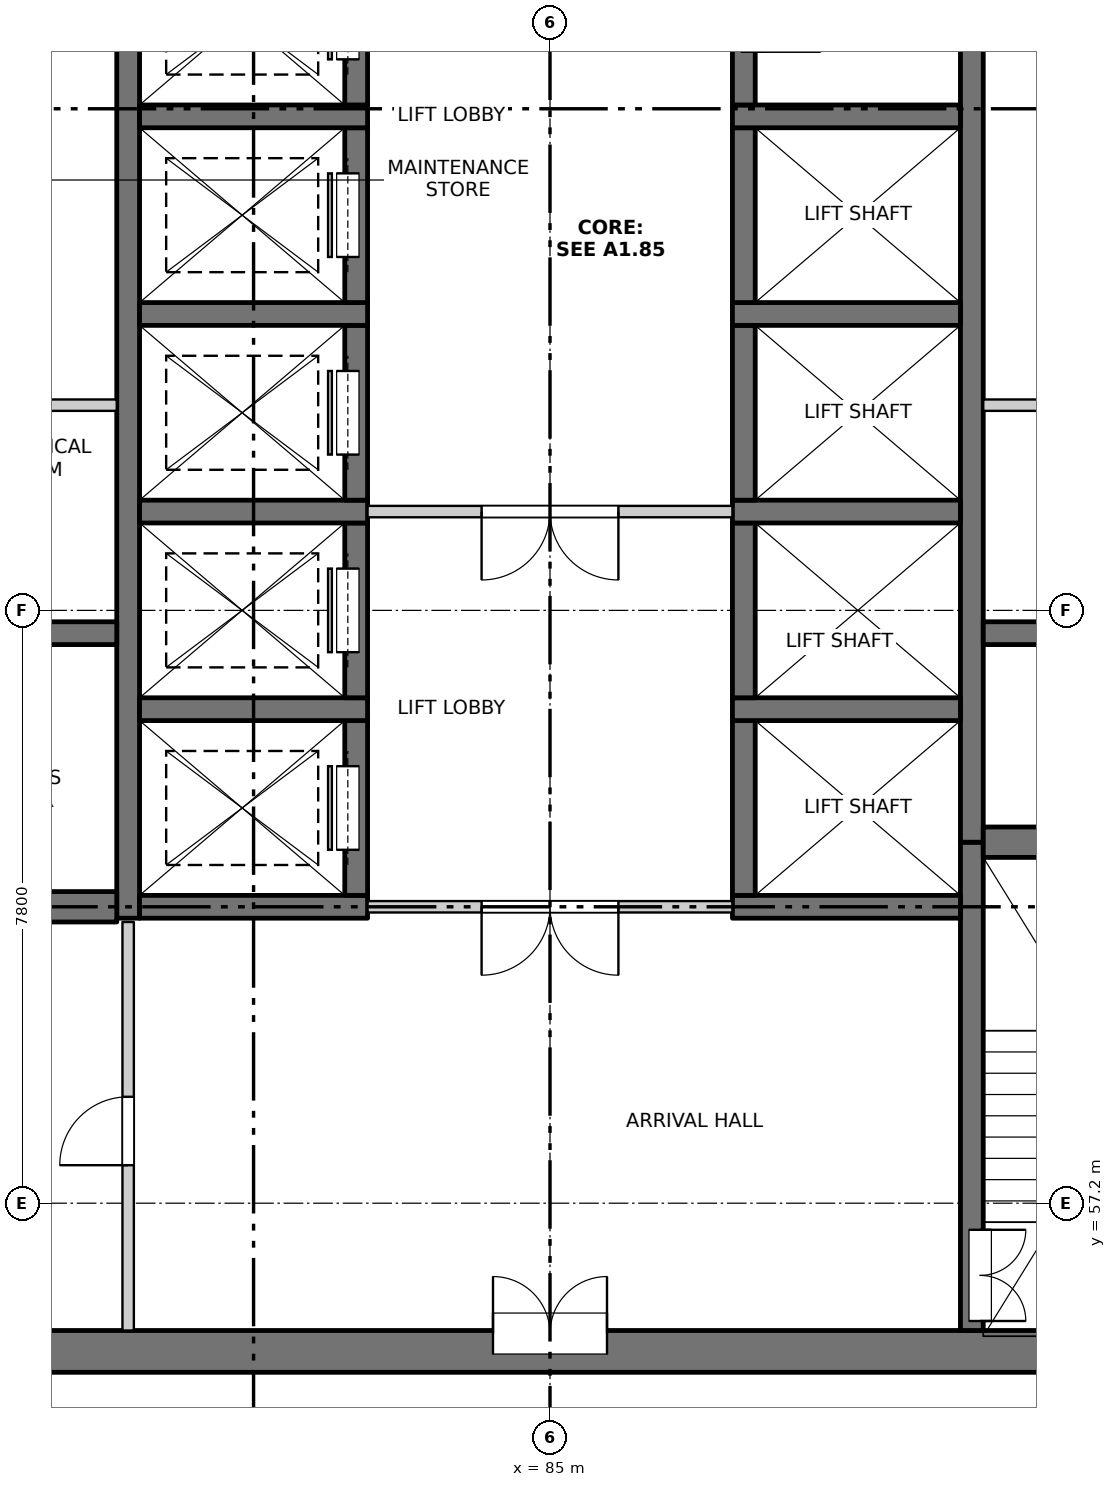
"""IFC4 building model, lengths in metres.
Left out: names, types, materials, properties, quantities, classifications, styles, units other than length and angle.
Written with IfcOpenShell. Run it as: python <this file> out.ifc"""

import sys

from ifc_helpers import new_model, si_unit, direction, frame, frame_2d, origin, place, context, subcontext, project, spatial, rectangle, extrude, element, fill, save


model = new_model("IFC4")
c1 = context("Model", 3, precision=1e-05, world=origin(), true_north=direction((0.0, 1.0)))
c2 = subcontext(c1, "Body", "Model", "MODEL_VIEW")
j1 = project(units=[si_unit("LENGTHUNIT", "METRE"), si_unit("PLANEANGLEUNIT", "RADIAN")], contexts=[c1])
p1 = place(None, origin())
s1 = spatial("IfcSite", under=j1, at=p1, CompositionType="ELEMENT")
p2 = place(p1, origin())
s2 = spatial("IfcBuilding", under=s1, at=p2, CompositionType="ELEMENT")
p3 = place(p2, frame((0.0, 0.0, 110.1)))
s3 = spatial("IfcBuildingStorey", under=s2, at=p3, CompositionType="ELEMENT", Elevation=110.1)
p4 = place(p3, frame((75.525, 55.25, -0.25), z_axis=(0.0, 0.0, 1.0), x_axis=(1.0, 0.0, 0.0)))
e1 = element("IfcWall", 1, at=p4, inside=s3, PredefinedType="SOLIDWALL", context=c2, shape_type="SweptSolid", body=[
    extrude(rectangle(XDim=18.95, YDim=0.55, at=frame_2d((9.475, 0.0))), origin(), (0.0, 0.0, 1.0), 3.4),
])
p5 = place(p4, frame((8.725, 0.0, 0.25)))
e2 = element("IfcOpeningElement", 2, at=p5, cuts=e1, PredefinedType="OPENING", context=c2, shape_type="SweptSolid", body=[
    extrude(rectangle(XDim=1.5, YDim=2.1, at=frame_2d((0.75, 1.05))), frame((0.0, 0.285, 0.0), z_axis=(0.0, -1.0, 0.0), x_axis=(1.0, 0.0, 0.0)), (0.0, 0.0, 1.0), 0.57),
])
p6 = place(p3, frame((79.45, 60.95, -0.25), z_axis=(0.0, 0.0, 1.0), x_axis=(0.0, 1.0, 0.0)))
e3 = element("IfcWall", 3, at=p6, inside=s3, PredefinedType="SOLIDWALL", context=c2, shape_type="SweptSolid", body=[
    extrude(rectangle(XDim=16.35, YDim=0.3, at=frame_2d((8.175, 0.0))), origin(), (0.0, 0.0, 1.0), 3.4),
])
p7 = place(p3, frame((90.55, 55.525, -0.25), z_axis=(0.0, 0.0, 1.0), x_axis=(0.0, 1.0, 0.0)))
e4 = element("IfcWall", 4, at=p7, inside=s3, PredefinedType="SOLIDWALL", context=c2, shape_type="SweptSolid", body=[
    extrude(rectangle(XDim=6.425, YDim=0.3, at=frame_2d((3.212, 0.0))), origin(), (0.0, 0.0, 1.0), 3.4),
])
p8 = place(p7, frame((0.125, 0.0, 0.25)))
e5 = element("IfcOpeningElement", 5, at=p8, cuts=e4, PredefinedType="OPENING", context=c2, shape_type="SweptSolid", body=[
    extrude(rectangle(XDim=1.2, YDim=2.1, at=frame_2d((0.6, 1.05))), frame((0.0, 0.16, 0.0), z_axis=(0.0, -1.0, 0.0), x_axis=(1.0, 0.0, 0.0)), (0.0, 0.0, 1.0), 0.32),
])
p9 = place(p3, frame((90.55, 61.95, -0.25), z_axis=(0.0, 0.0, 1.0), x_axis=(0.0, 1.0, 0.0)))
e6 = element("IfcWall", 6, at=p9, inside=s3, PredefinedType="SOLIDWALL", context=c2, shape_type="SweptSolid", body=[
    extrude(rectangle(XDim=15.35, YDim=0.3, at=frame_2d((7.675, 0.0))), origin(), (0.0, 0.0, 1.0), 3.4),
])
p10 = place(p3, frame((79.6, 61.1, -0.25), z_axis=(0.0, 0.0, 1.0), x_axis=(1.0, 0.0, 0.0)))
e7 = element("IfcWall", 7, at=p10, inside=s3, PredefinedType="SOLIDWALL", context=c2, shape_type="SweptSolid", body=[
    extrude(rectangle(XDim=3.0, YDim=0.3, at=frame_2d((1.5, 0.0))), origin(), (0.0, 0.0, 1.0), 3.4),
])
p11 = place(p3, frame((82.45, 61.25, -0.25), z_axis=(0.0, 0.0, 1.0), x_axis=(0.0, 1.0, 0.0)))
e8 = element("IfcWall", 8, at=p11, inside=s3, PredefinedType="SOLIDWALL", context=c2, shape_type="SweptSolid", body=[
    extrude(rectangle(XDim=2.3, YDim=0.3, at=frame_2d((1.15, 0.0))), origin(), (0.0, 0.0, 1.0), 3.4),
])
p12 = place(p11, frame((0.6, 0.0, 0.25)))
e9 = element("IfcOpeningElement", 9, at=p12, cuts=e8, PredefinedType="OPENING", context=c2, shape_type="SweptSolid", body=[
    extrude(rectangle(XDim=1.1, YDim=2.1, at=frame_2d((0.55, 1.05))), frame((0.0, 0.16, 0.0), z_axis=(0.0, -1.0, 0.0), x_axis=(1.0, 0.0, 0.0)), (0.0, 0.0, 1.0), 0.32),
])
p13 = place(p3, frame((79.6, 63.7, -0.25), z_axis=(0.0, 0.0, 1.0), x_axis=(1.0, 0.0, 0.0)))
e10 = element("IfcWall", 10, at=p13, inside=s3, PredefinedType="SOLIDWALL", context=c2, shape_type="SweptSolid", body=[
    extrude(rectangle(XDim=3.0, YDim=0.3, at=frame_2d((1.5, 0.0))), origin(), (0.0, 0.0, 1.0), 3.4),
])
p14 = place(p3, frame((82.45, 63.85, -0.25), z_axis=(0.0, 0.0, 1.0), x_axis=(0.0, 1.0, 0.0)))
e11 = element("IfcWall", 11, at=p14, inside=s3, PredefinedType="SOLIDWALL", context=c2, shape_type="SweptSolid", body=[
    extrude(rectangle(XDim=2.3, YDim=0.3, at=frame_2d((1.15, 0.0))), origin(), (0.0, 0.0, 1.0), 3.4),
])
p15 = place(p14, frame((0.6, 0.0, 0.25)))
e12 = element("IfcOpeningElement", 12, at=p15, cuts=e11, PredefinedType="OPENING", context=c2, shape_type="SweptSolid", body=[
    extrude(rectangle(XDim=1.1, YDim=2.1, at=frame_2d((0.55, 1.05))), frame((0.0, 0.16, 0.0), z_axis=(0.0, -1.0, 0.0), x_axis=(1.0, 0.0, 0.0)), (0.0, 0.0, 1.0), 0.32),
])
p16 = place(p3, frame((79.6, 66.3, -0.25), z_axis=(0.0, 0.0, 1.0), x_axis=(1.0, 0.0, 0.0)))
e13 = element("IfcWall", 13, at=p16, inside=s3, PredefinedType="SOLIDWALL", context=c2, shape_type="SweptSolid", body=[
    extrude(rectangle(XDim=3.0, YDim=0.3, at=frame_2d((1.5, 0.0))), origin(), (0.0, 0.0, 1.0), 3.4),
])
p17 = place(p3, frame((82.45, 66.45, -0.25), z_axis=(0.0, 0.0, 1.0), x_axis=(0.0, 1.0, 0.0)))
e14 = element("IfcWall", 14, at=p17, inside=s3, PredefinedType="SOLIDWALL", context=c2, shape_type="SweptSolid", body=[
    extrude(rectangle(XDim=2.3, YDim=0.3, at=frame_2d((1.15, 0.0))), origin(), (0.0, 0.0, 1.0), 3.4),
])
p18 = place(p17, frame((0.6, 0.0, 0.25)))
e15 = element("IfcOpeningElement", 15, at=p18, cuts=e14, PredefinedType="OPENING", context=c2, shape_type="SweptSolid", body=[
    extrude(rectangle(XDim=1.1, YDim=2.1, at=frame_2d((0.55, 1.05))), frame((0.0, 0.16, 0.0), z_axis=(0.0, -1.0, 0.0), x_axis=(1.0, 0.0, 0.0)), (0.0, 0.0, 1.0), 0.32),
])
p19 = place(p3, frame((79.6, 68.9, -0.25), z_axis=(0.0, 0.0, 1.0), x_axis=(1.0, 0.0, 0.0)))
e16 = element("IfcWall", 16, at=p19, inside=s3, PredefinedType="SOLIDWALL", context=c2, shape_type="SweptSolid", body=[
    extrude(rectangle(XDim=3.0, YDim=0.3, at=frame_2d((1.5, 0.0))), origin(), (0.0, 0.0, 1.0), 3.4),
])
p20 = place(p3, frame((82.45, 69.05, -0.25), z_axis=(0.0, 0.0, 1.0), x_axis=(0.0, 1.0, 0.0)))
e17 = element("IfcWall", 17, at=p20, inside=s3, PredefinedType="SOLIDWALL", context=c2, shape_type="SweptSolid", body=[
    extrude(rectangle(XDim=2.3, YDim=0.3, at=frame_2d((1.15, 0.0))), origin(), (0.0, 0.0, 1.0), 3.4),
])
p21 = place(p20, frame((0.6, 0.0, 0.25)))
e18 = element("IfcOpeningElement", 18, at=p21, cuts=e17, PredefinedType="OPENING", context=c2, shape_type="SweptSolid", body=[
    extrude(rectangle(XDim=1.1, YDim=2.1, at=frame_2d((0.55, 1.05))), frame((0.0, 0.16, 0.0), z_axis=(0.0, -1.0, 0.0), x_axis=(1.0, 0.0, 0.0)), (0.0, 0.0, 1.0), 0.32),
])
p22 = place(p3, frame((79.6, 71.5, -0.25), z_axis=(0.0, 0.0, 1.0), x_axis=(1.0, 0.0, 0.0)))
e19 = element("IfcWall", 19, at=p22, inside=s3, PredefinedType="SOLIDWALL", context=c2, shape_type="SweptSolid", body=[
    extrude(rectangle(XDim=3.0, YDim=0.3, at=frame_2d((1.5, 0.0))), origin(), (0.0, 0.0, 1.0), 3.4),
])
p23 = place(p3, frame((82.45, 71.65, -0.25), z_axis=(0.0, 0.0, 1.0), x_axis=(0.0, 1.0, 0.0)))
e20 = element("IfcWall", 20, at=p23, inside=s3, PredefinedType="SOLIDWALL", context=c2, shape_type="SweptSolid", body=[
    extrude(rectangle(XDim=2.3, YDim=0.3, at=frame_2d((1.15, 0.0))), origin(), (0.0, 0.0, 1.0), 3.4),
])
p24 = place(p23, frame((0.6, 0.0, 0.25)))
e21 = element("IfcOpeningElement", 21, at=p24, cuts=e20, PredefinedType="OPENING", context=c2, shape_type="SweptSolid", body=[
    extrude(rectangle(XDim=1.1, YDim=2.1, at=frame_2d((0.55, 1.05))), frame((0.0, 0.16, 0.0), z_axis=(0.0, -1.0, 0.0), x_axis=(1.0, 0.0, 0.0)), (0.0, 0.0, 1.0), 0.32),
])
p25 = place(p3, frame((87.4, 61.1, -0.25), z_axis=(0.0, 0.0, 1.0), x_axis=(1.0, 0.0, 0.0)))
e22 = element("IfcWall", 22, at=p25, inside=s3, PredefinedType="SOLIDWALL", context=c2, shape_type="SweptSolid", body=[
    extrude(rectangle(XDim=3.0, YDim=0.3, at=frame_2d((1.5, 0.0))), origin(), (0.0, 0.0, 1.0), 3.4),
])
p26 = place(p3, frame((87.55, 61.25, -0.25), z_axis=(0.0, 0.0, 1.0), x_axis=(0.0, 1.0, 0.0)))
e23 = element("IfcWall", 23, at=p26, inside=s3, PredefinedType="SOLIDWALL", context=c2, shape_type="SweptSolid", body=[
    extrude(rectangle(XDim=2.3, YDim=0.3, at=frame_2d((1.15, 0.0))), origin(), (0.0, 0.0, 1.0), 3.4),
])
p27 = place(p3, frame((87.4, 63.7, -0.25), z_axis=(0.0, 0.0, 1.0), x_axis=(1.0, 0.0, 0.0)))
e24 = element("IfcWall", 24, at=p27, inside=s3, PredefinedType="SOLIDWALL", context=c2, shape_type="SweptSolid", body=[
    extrude(rectangle(XDim=3.0, YDim=0.3, at=frame_2d((1.5, 0.0))), origin(), (0.0, 0.0, 1.0), 3.4),
])
p28 = place(p3, frame((87.55, 63.85, -0.25), z_axis=(0.0, 0.0, 1.0), x_axis=(0.0, 1.0, 0.0)))
e25 = element("IfcWall", 25, at=p28, inside=s3, PredefinedType="SOLIDWALL", context=c2, shape_type="SweptSolid", body=[
    extrude(rectangle(XDim=2.3, YDim=0.3, at=frame_2d((1.15, 0.0))), origin(), (0.0, 0.0, 1.0), 3.4),
])
p29 = place(p3, frame((87.4, 66.3, -0.25), z_axis=(0.0, 0.0, 1.0), x_axis=(1.0, 0.0, 0.0)))
e26 = element("IfcWall", 26, at=p29, inside=s3, PredefinedType="SOLIDWALL", context=c2, shape_type="SweptSolid", body=[
    extrude(rectangle(XDim=3.0, YDim=0.3, at=frame_2d((1.5, 0.0))), origin(), (0.0, 0.0, 1.0), 3.4),
])
p30 = place(p3, frame((87.55, 66.45, -0.25), z_axis=(0.0, 0.0, 1.0), x_axis=(0.0, 1.0, 0.0)))
e27 = element("IfcWall", 27, at=p30, inside=s3, PredefinedType="SOLIDWALL", context=c2, shape_type="SweptSolid", body=[
    extrude(rectangle(XDim=2.3, YDim=0.3, at=frame_2d((1.15, 0.0))), origin(), (0.0, 0.0, 1.0), 3.4),
])
p31 = place(p3, frame((87.4, 68.9, -0.25), z_axis=(0.0, 0.0, 1.0), x_axis=(1.0, 0.0, 0.0)))
e28 = element("IfcWall", 28, at=p31, inside=s3, PredefinedType="SOLIDWALL", context=c2, shape_type="SweptSolid", body=[
    extrude(rectangle(XDim=3.0, YDim=0.3, at=frame_2d((1.5, 0.0))), origin(), (0.0, 0.0, 1.0), 3.4),
])
p32 = place(p3, frame((87.55, 69.05, -0.25), z_axis=(0.0, 0.0, 1.0), x_axis=(0.0, 1.0, 0.0)))
e29 = element("IfcWall", 29, at=p32, inside=s3, PredefinedType="SOLIDWALL", context=c2, shape_type="SweptSolid", body=[
    extrude(rectangle(XDim=2.3, YDim=0.3, at=frame_2d((1.15, 0.0))), origin(), (0.0, 0.0, 1.0), 3.4),
])
p33 = place(p3, frame((87.4, 71.5, -0.25), z_axis=(0.0, 0.0, 1.0), x_axis=(1.0, 0.0, 0.0)))
e30 = element("IfcWall", 30, at=p33, inside=s3, PredefinedType="SOLIDWALL", context=c2, shape_type="SweptSolid", body=[
    extrude(rectangle(XDim=3.0, YDim=0.3, at=frame_2d((1.5, 0.0))), origin(), (0.0, 0.0, 1.0), 3.4),
])
p34 = place(p3, frame((87.55, 71.65, -0.25), z_axis=(0.0, 0.0, 1.0), x_axis=(0.0, 1.0, 0.0)))
e31 = element("IfcWall", 31, at=p34, inside=s3, PredefinedType="SOLIDWALL", context=c2, shape_type="SweptSolid", body=[
    extrude(rectangle(XDim=2.3, YDim=0.3, at=frame_2d((1.15, 0.0))), origin(), (0.0, 0.0, 1.0), 3.4),
])
p35 = place(p34, frame((0.7, 0.0, 0.25)))
e32 = element("IfcOpeningElement", 32, at=p35, cuts=e31, PredefinedType="OPENING", context=c2, shape_type="SweptSolid", body=[
    extrude(rectangle(XDim=0.9, YDim=2.1, at=frame_2d((0.45, 1.05))), frame((0.0, 0.16, 0.0), z_axis=(0.0, -1.0, 0.0), x_axis=(1.0, 0.0, 0.0)), (0.0, 0.0, 1.0), 0.32),
])
p36 = place(p3, frame((75.525, 61.1, -0.25), z_axis=(0.0, 0.0, 1.0), x_axis=(1.0, 0.0, 0.0)))
e33 = element("IfcWall", 33, at=p36, inside=s3, PredefinedType="SOLIDWALL", context=c2, shape_type="SweptSolid", body=[
    extrude(rectangle(XDim=3.775, YDim=0.4, at=frame_2d((1.888, 0.0))), origin(), (0.0, 0.0, 1.0), 3.4),
])
p37 = place(p3, frame((75.525, 64.7, -0.25), z_axis=(0.0, 0.0, 1.0), x_axis=(1.0, 0.0, 0.0)))
e34 = element("IfcWall", 34, at=p37, inside=s3, PredefinedType="SOLIDWALL", context=c2, shape_type="SweptSolid", body=[
    extrude(rectangle(XDim=3.775, YDim=0.3, at=frame_2d((1.888, 0.0))), origin(), (0.0, 0.0, 1.0), 3.4),
])
p38 = place(p3, frame((90.7, 61.95, -0.25), z_axis=(0.0, 0.0, 1.0), x_axis=(1.0, 0.0, 0.0)))
e35 = element("IfcWall", 35, at=p38, inside=s3, PredefinedType="SOLIDWALL", context=c2, shape_type="SweptSolid", body=[
    extrude(rectangle(XDim=3.775, YDim=0.4, at=frame_2d((1.888, 0.0))), origin(), (0.0, 0.0, 1.0), 3.4),
])
p39 = place(p3, frame((90.7, 64.7, -0.25), z_axis=(0.0, 0.0, 1.0), x_axis=(1.0, 0.0, 0.0)))
e36 = element("IfcWall", 36, at=p39, inside=s3, PredefinedType="SOLIDWALL", context=c2, shape_type="SweptSolid", body=[
    extrude(rectangle(XDim=3.775, YDim=0.3, at=frame_2d((1.888, 0.0))), origin(), (0.0, 0.0, 1.0), 3.4),
])
p40 = place(p3, frame((82.6, 61.1, 0.0), z_axis=(0.0, 0.0, 1.0), x_axis=(1.0, 0.0, 0.0)))
e37 = element("IfcWall", 37, at=p40, inside=s3, PredefinedType="PARTITIONING", context=c2, shape_type="SweptSolid", body=[
    extrude(rectangle(XDim=4.8, YDim=0.15, at=frame_2d((2.4, 0.0))), origin(), (0.0, 0.0, 1.0), 3.15),
])
p41 = place(p40, frame((1.5, 0.0, 0.0)))
e38 = element("IfcOpeningElement", 38, at=p41, cuts=e37, PredefinedType="OPENING", context=c2, shape_type="SweptSolid", body=[
    extrude(rectangle(XDim=1.8, YDim=2.1, at=frame_2d((0.9, 1.05))), frame((0.0, 0.085, 0.0), z_axis=(0.0, -1.0, 0.0), x_axis=(1.0, 0.0, 0.0)), (0.0, 0.0, 1.0), 0.17),
])
p42 = place(p3, frame((82.6, 66.3, 0.0), z_axis=(0.0, 0.0, 1.0), x_axis=(1.0, 0.0, 0.0)))
e39 = element("IfcWall", 39, at=p42, inside=s3, PredefinedType="PARTITIONING", context=c2, shape_type="SweptSolid", body=[
    extrude(rectangle(XDim=4.8, YDim=0.15, at=frame_2d((2.4, 0.0))), origin(), (0.0, 0.0, 1.0), 3.15),
])
p43 = place(p42, frame((1.5, 0.0, 0.0)))
e40 = element("IfcOpeningElement", 40, at=p43, cuts=e39, PredefinedType="OPENING", context=c2, shape_type="SweptSolid", body=[
    extrude(rectangle(XDim=1.8, YDim=2.1, at=frame_2d((0.9, 1.05))), frame((0.0, 0.085, 0.0), z_axis=(0.0, -1.0, 0.0), x_axis=(1.0, 0.0, 0.0)), (0.0, 0.0, 1.0), 0.17),
])
for number, where, z_axis, x_axis in (
    (41, (75.525, 67.7, 0.0), (0.0, 0.0, 1.0), (1.0, 0.0, 0.0)),
    (42, (90.7, 67.7, 0.0), (0.0, 0.0, 1.0), (1.0, 0.0, 0.0)),
):
    element("IfcWall", number, at=place(p3, frame(where, z_axis=z_axis, x_axis=x_axis)), inside=s3, PredefinedType="PARTITIONING", context=c2, shape_type="SweptSolid", body=[
        extrude(rectangle(XDim=3.775, YDim=0.15, at=frame_2d((1.887, 0.0))), origin(), (0.0, 0.0, 1.0), 3.15),
    ])
p44 = place(p3, frame((79.45, 55.525, 0.0), z_axis=(0.0, 0.0, 1.0), x_axis=(0.0, 1.0, 0.0)))
e43 = element("IfcWall", 43, at=p44, inside=s3, PredefinedType="PARTITIONING", context=c2, shape_type="SweptSolid", body=[
    extrude(rectangle(XDim=5.375, YDim=0.15, at=frame_2d((2.688, 0.0))), origin(), (0.0, 0.0, 1.0), 3.15),
])
p45 = place(p44, frame((2.175, 0.0, 0.0)))
e44 = element("IfcOpeningElement", 44, at=p45, cuts=e43, PredefinedType="OPENING", context=c2, shape_type="SweptSolid", body=[
    extrude(rectangle(XDim=0.9, YDim=2.1, at=frame_2d((0.45, 1.05))), frame((0.0, 0.085, 0.0), z_axis=(0.0, -1.0, 0.0), x_axis=(1.0, 0.0, 0.0)), (0.0, 0.0, 1.0), 0.17),
])
p46 = place(p5, origin())
e45 = element("IfcDoor", 45, at=p46, inside=s3, OperationType="DOUBLE_DOOR_SINGLE_SWING", PredefinedType="DOOR", context=c2, shape_type="SweptSolid", body=[
    extrude(rectangle(XDim=1.5, YDim=2.1, at=frame_2d((0.75, 1.05))), frame((0.0, 0.26, 0.0), z_axis=(0.0, -1.0, 0.0), x_axis=(1.0, 0.0, 0.0)), (0.0, 0.0, 1.0), 0.05),
])
fill(e2, e45)
p47 = place(p8, origin())
e46 = element("IfcDoor", 46, at=p47, inside=s3, OperationType="DOUBLE_DOOR_SINGLE_SWING", PredefinedType="DOOR", context=c2, shape_type="SweptSolid", body=[
    extrude(rectangle(XDim=1.2, YDim=2.1, at=frame_2d((0.6, 1.05))), frame((0.0, -0.085, 0.0), z_axis=(0.0, -1.0, 0.0), x_axis=(1.0, 0.0, 0.0)), (0.0, 0.0, 1.0), 0.05),
])
fill(e5, e46)
p48 = place(p45, origin())
e47 = element("IfcDoor", 47, at=p48, inside=s3, OperationType="SINGLE_SWING_LEFT", PredefinedType="DOOR", context=c2, shape_type="SweptSolid", body=[
    extrude(rectangle(XDim=0.9, YDim=2.1, at=frame_2d((0.45, 1.05))), frame((0.0, 0.025, 0.0), z_axis=(0.0, -1.0, 0.0), x_axis=(1.0, 0.0, 0.0)), (0.0, 0.0, 1.0), 0.05),
])
fill(e44, e47)
p49 = place(p41, origin())
e48 = element("IfcDoor", 48, at=p49, inside=s3, OperationType="DOUBLE_DOOR_SINGLE_SWING", PredefinedType="DOOR", context=c2, shape_type="SweptSolid", body=[
    extrude(rectangle(XDim=1.8, YDim=2.1, at=frame_2d((0.9, 1.05))), frame((0.0, 0.025, 0.0), z_axis=(0.0, -1.0, 0.0), x_axis=(1.0, 0.0, 0.0)), (0.0, 0.0, 1.0), 0.05),
])
fill(e38, e48)
p50 = place(p12, origin())
e49 = element("IfcDoor", 49, at=p50, inside=s3, OperationType="SLIDING_TO_RIGHT", PredefinedType="DOOR", context=c2, shape_type="SweptSolid", body=[
    extrude(rectangle(XDim=1.1, YDim=2.1, at=frame_2d((0.55, 1.05))), frame((0.0, 0.135, 0.0), z_axis=(0.0, -1.0, 0.0), x_axis=(1.0, 0.0, 0.0)), (0.0, 0.0, 1.0), 0.05),
])
fill(e9, e49)
p51 = place(p15, origin())
e50 = element("IfcDoor", 50, at=p51, inside=s3, OperationType="SLIDING_TO_RIGHT", PredefinedType="DOOR", context=c2, shape_type="SweptSolid", body=[
    extrude(rectangle(XDim=1.1, YDim=2.1, at=frame_2d((0.55, 1.05))), frame((0.0, 0.135, 0.0), z_axis=(0.0, -1.0, 0.0), x_axis=(1.0, 0.0, 0.0)), (0.0, 0.0, 1.0), 0.05),
])
fill(e12, e50)
p52 = place(p43, origin())
e51 = element("IfcDoor", 51, at=p52, inside=s3, OperationType="DOUBLE_DOOR_SINGLE_SWING", PredefinedType="DOOR", context=c2, shape_type="SweptSolid", body=[
    extrude(rectangle(XDim=1.8, YDim=2.1, at=frame_2d((0.9, 1.05))), frame((0.0, 0.025, 0.0), z_axis=(0.0, -1.0, 0.0), x_axis=(1.0, 0.0, 0.0)), (0.0, 0.0, 1.0), 0.05),
])
fill(e40, e51)
p53 = place(p18, origin())
e52 = element("IfcDoor", 52, at=p53, inside=s3, OperationType="SLIDING_TO_RIGHT", PredefinedType="DOOR", context=c2, shape_type="SweptSolid", body=[
    extrude(rectangle(XDim=1.1, YDim=2.1, at=frame_2d((0.55, 1.05))), frame((0.0, 0.135, 0.0), z_axis=(0.0, -1.0, 0.0), x_axis=(1.0, 0.0, 0.0)), (0.0, 0.0, 1.0), 0.05),
])
fill(e15, e52)
p54 = place(p21, origin())
e53 = element("IfcDoor", 53, at=p54, inside=s3, OperationType="SLIDING_TO_LEFT", PredefinedType="DOOR", context=c2, shape_type="SweptSolid", body=[
    extrude(rectangle(XDim=1.1, YDim=2.1, at=frame_2d((0.55, 1.05))), frame((0.0, 0.135, 0.0), z_axis=(0.0, -1.0, 0.0), x_axis=(1.0, 0.0, 0.0)), (0.0, 0.0, 1.0), 0.05),
])
fill(e18, e53)
p55 = place(p24, origin())
e54 = element("IfcDoor", 54, at=p55, inside=s3, OperationType="SLIDING_TO_LEFT", PredefinedType="DOOR", context=c2, shape_type="SweptSolid", body=[
    extrude(rectangle(XDim=1.1, YDim=2.1, at=frame_2d((0.55, 1.05))), frame((0.0, 0.135, 0.0), z_axis=(0.0, -1.0, 0.0), x_axis=(1.0, 0.0, 0.0)), (0.0, 0.0, 1.0), 0.05),
])
fill(e21, e54)
p56 = place(p35, origin())
e55 = element("IfcDoor", 55, at=p56, inside=s3, OperationType="SINGLE_SWING_RIGHT", PredefinedType="DOOR", context=c2, shape_type="SweptSolid", body=[
    extrude(rectangle(XDim=0.9, YDim=2.1, at=frame_2d((0.45, 1.05))), frame((0.0, -0.085, 0.0), z_axis=(0.0, -1.0, 0.0), x_axis=(1.0, 0.0, 0.0)), (0.0, 0.0, 1.0), 0.05),
])
fill(e32, e55)
save(model, sys.argv[1])
